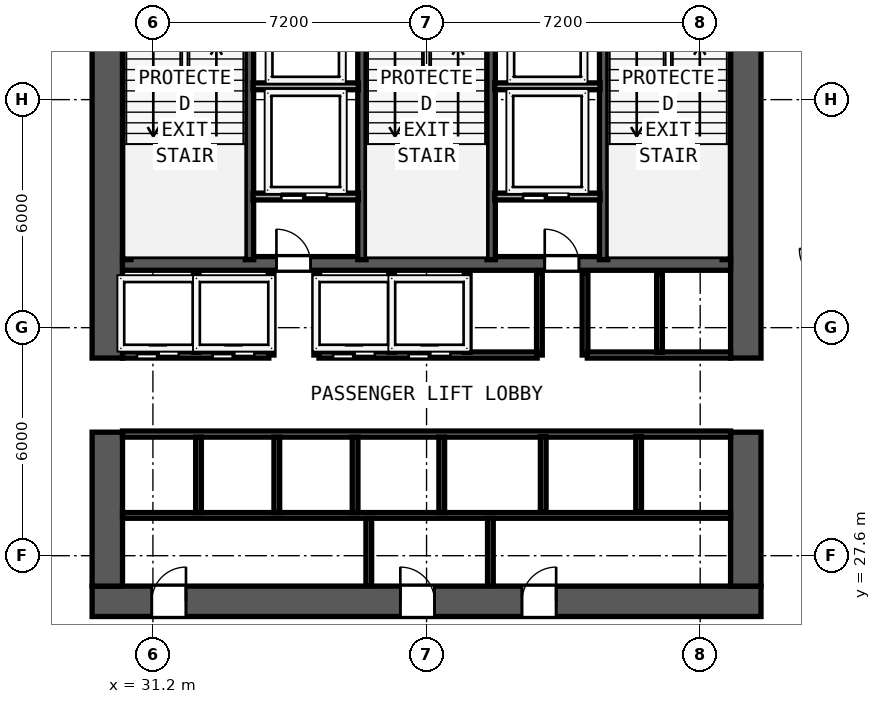
"""IFC4 building model, lengths in metres.
Left out: names, types, materials, properties, quantities, classifications, styles, units other than length and angle.
Written with IfcOpenShell. Run it as: python <this file> out.ifc"""

import sys

from ifc_helpers import new_model, si_unit, direction, frame, frame_2d, origin, place, context, subcontext, project, spatial, rectangle, extrude, element, fill, save


model = new_model("IFC4")
c1 = context("Model", 3, precision=1e-05, world=origin(), true_north=direction((0.0, 1.0)))
c2 = subcontext(c1, "Body", "Model", "MODEL_VIEW")
j1 = project(units=[si_unit("LENGTHUNIT", "METRE"), si_unit("PLANEANGLEUNIT", "RADIAN")], contexts=[c1])
p1 = place(None, origin())
s1 = spatial("IfcSite", under=j1, at=p1, CompositionType="ELEMENT")
p2 = place(p1, origin())
s2 = spatial("IfcBuilding", under=s1, at=p2, CompositionType="ELEMENT")
p3 = place(p2, frame((0.0, 0.0, 70.4)))
s3 = spatial("IfcBuildingStorey", under=s2, at=p3, CompositionType="ELEMENT", Elevation=70.4)
p4 = place(p3, frame((29.6, 26.4, 0.0), z_axis=(0.0, 0.0, 1.0), x_axis=(1.0, 0.0, 0.0)))
e1 = element("IfcWall", 1, at=p4, inside=s3, PredefinedType="SHEAR", context=c2, shape_type="SweptSolid", body=[
    extrude(rectangle(XDim=17.6, YDim=0.8, at=frame_2d((8.8, 0.0))), origin(), (0.0, 0.0, 1.0), 3.6),
])
p5 = place(p4, frame((2.47, 0.0, 0.0), z_axis=(0.0, 0.0, 1.0), x_axis=(-1.0, 0.0, 0.0)))
e2 = element("IfcOpeningElement", 2, at=p5, cuts=e1, PredefinedType="OPENING", context=c2, shape_type="SweptSolid", body=[
    extrude(rectangle(XDim=0.9, YDim=2.1, at=frame_2d((0.45, 1.05))), frame((0.0, 0.41, 0.0), z_axis=(0.0, -1.0, 0.0), x_axis=(1.0, 0.0, 0.0)), (0.0, 0.0, 1.0), 0.82),
])
p6 = place(p4, frame((9.01, 0.0, 0.0), z_axis=(0.0, 0.0, 1.0), x_axis=(-1.0, 0.0, 0.0)))
e3 = element("IfcOpeningElement", 3, at=p6, cuts=e1, PredefinedType="OPENING", context=c2, shape_type="SweptSolid", body=[
    extrude(rectangle(XDim=0.9, YDim=2.1, at=frame_2d((0.45, 1.05))), frame((0.0, 0.41, 0.0), z_axis=(0.0, -1.0, 0.0), x_axis=(1.0, 0.0, 0.0)), (0.0, 0.0, 1.0), 0.82),
])
p7 = place(p4, frame((12.21, 0.0, 0.0), z_axis=(0.0, 0.0, 1.0), x_axis=(-1.0, 0.0, 0.0)))
e4 = element("IfcOpeningElement", 4, at=p7, cuts=e1, PredefinedType="OPENING", context=c2, shape_type="SweptSolid", body=[
    extrude(rectangle(XDim=0.9, YDim=2.1, at=frame_2d((0.45, 1.05))), frame((0.0, 0.41, 0.0), z_axis=(0.0, -1.0, 0.0), x_axis=(1.0, 0.0, 0.0)), (0.0, 0.0, 1.0), 0.82),
])
p8 = place(p3, frame((30.0, 26.8, 0.0), z_axis=(0.0, 0.0, 1.0), x_axis=(0.0, 1.0, 0.0)))
e5 = element("IfcWall", 5, at=p8, inside=s3, PredefinedType="SHEAR", context=c2, shape_type="SweptSolid", body=[
    extrude(rectangle(XDim=4.05, YDim=0.8, at=frame_2d((2.025, 0.0))), origin(), (0.0, 0.0, 1.0), 3.6),
])
p9 = place(p3, frame((30.0, 32.8, 0.0), z_axis=(0.0, 0.0, 1.0), x_axis=(0.0, 1.0, 0.0)))
e6 = element("IfcWall", 6, at=p9, inside=s3, PredefinedType="SHEAR", context=c2, shape_type="SweptSolid", body=[
    extrude(rectangle(XDim=10.0, YDim=0.8, at=frame_2d((5.0, 0.0))), origin(), (0.0, 0.0, 1.0), 3.6),
])
p10 = place(p3, frame((46.8, 26.8, 0.0), z_axis=(0.0, 0.0, 1.0), x_axis=(0.0, 1.0, 0.0)))
e7 = element("IfcWall", 7, at=p10, inside=s3, PredefinedType="SHEAR", context=c2, shape_type="SweptSolid", body=[
    extrude(rectangle(XDim=4.05, YDim=0.8, at=frame_2d((2.025, 0.0))), origin(), (0.0, 0.0, 1.0), 3.6),
])
p11 = place(p3, frame((46.8, 32.8, 0.0), z_axis=(0.0, 0.0, 1.0), x_axis=(0.0, 1.0, 0.0)))
e8 = element("IfcWall", 8, at=p11, inside=s3, PredefinedType="SHEAR", context=c2, shape_type="SweptSolid", body=[
    extrude(rectangle(XDim=10.0, YDim=0.8, at=frame_2d((5.0, 0.0))), origin(), (0.0, 0.0, 1.0), 3.6),
])
p12 = place(p3, frame((30.4, 35.29, 0.0), z_axis=(0.0, 0.0, 1.0), x_axis=(1.0, 0.0, 0.0)))
e9 = element("IfcWall", 9, at=p12, inside=s3, PredefinedType="SHEAR", context=c2, shape_type="SweptSolid", body=[
    extrude(rectangle(XDim=16.0, YDim=0.36, at=frame_2d((8.0, 0.0))), origin(), (0.0, 0.0, 1.0), 3.6),
])
p13 = place(p12, frame((4.95, 0.0, 0.0), z_axis=(0.0, 0.0, 1.0), x_axis=(-1.0, 0.0, 0.0)))
e10 = element("IfcOpeningElement", 10, at=p13, cuts=e9, PredefinedType="OPENING", context=c2, shape_type="SweptSolid", body=[
    extrude(rectangle(XDim=0.9, YDim=2.1, at=frame_2d((0.45, 1.05))), frame((0.0, 0.19, 0.0), z_axis=(0.0, -1.0, 0.0), x_axis=(1.0, 0.0, 0.0)), (0.0, 0.0, 1.0), 0.38),
])
p14 = place(p12, frame((12.01, 0.0, 0.0), z_axis=(0.0, 0.0, 1.0), x_axis=(-1.0, 0.0, 0.0)))
e11 = element("IfcOpeningElement", 11, at=p14, cuts=e9, PredefinedType="OPENING", context=c2, shape_type="SweptSolid", body=[
    extrude(rectangle(XDim=0.9, YDim=2.1, at=frame_2d((0.45, 1.05))), frame((0.0, 0.19, 0.0), z_axis=(0.0, -1.0, 0.0), x_axis=(1.0, 0.0, 0.0)), (0.0, 0.0, 1.0), 0.38),
])
for number, where, z_axis, x_axis in (
    (12, (30.512, 35.39, 0.0), (0.0, 0.0, 1.0), (0.0, 1.0, 0.0)),
    (13, (33.74, 35.39, 0.0), (0.0, 0.0, 1.0), (0.0, 1.0, 0.0)),
    (14, (36.7, 35.39, 0.0), (0.0, 0.0, 1.0), (0.0, 1.0, 0.0)),
    (15, (40.1, 35.39, 0.0), (0.0, 0.0, 1.0), (0.0, 1.0, 0.0)),
    (16, (43.06, 35.39, 0.0), (0.0, 0.0, 1.0), (0.0, 1.0, 0.0)),
    (17, (46.288, 35.39, 0.0), (0.0, 0.0, 1.0), (0.0, 1.0, 0.0)),
):
    element("IfcWall", number, at=place(p3, frame(where, z_axis=z_axis, x_axis=x_axis)), inside=s3, PredefinedType="SHEAR", context=c2, shape_type="SweptSolid", body=[
        extrude(rectangle(XDim=7.41, YDim=0.22, at=frame_2d((3.705, 0.0))), origin(), (0.0, 0.0, 1.0), 3.6),
    ])
for number, where, z_axis, x_axis in (
    (18, (33.835, 39.95, 0.0), (0.0, 0.0, 1.0), (1.0, 0.0, 0.0)),
    (19, (40.195, 39.95, 0.0), (0.0, 0.0, 1.0), (1.0, 0.0, 0.0)),
):
    element("IfcWall", number, at=place(p3, frame(where, z_axis=z_axis, x_axis=x_axis)), inside=s3, PredefinedType="SOLIDWALL", context=c2, shape_type="SweptSolid", body=[
        extrude(rectangle(XDim=2.77, YDim=0.18, at=frame_2d((1.385, 0.0))), origin(), (0.0, 0.0, 1.0), 3.6),
    ])
p15 = place(p3, frame((33.835, 37.05, 0.0), z_axis=(0.0, 0.0, 1.0), x_axis=(1.0, 0.0, 0.0)))
e20 = element("IfcWall", 20, at=p15, inside=s3, PredefinedType="SOLIDWALL", context=c2, shape_type="SweptSolid", body=[
    extrude(rectangle(XDim=2.77, YDim=0.18, at=frame_2d((1.385, 0.0))), origin(), (0.0, 0.0, 1.0), 3.6),
])
p16 = place(p15, frame((1.945, 0.0, 0.0), z_axis=(0.0, 0.0, 1.0), x_axis=(-1.0, 0.0, 0.0)))
e21 = element("IfcOpeningElement", 21, at=p16, cuts=e20, PredefinedType="OPENING", context=c2, shape_type="SweptSolid", body=[
    extrude(rectangle(XDim=1.2, YDim=2.2, at=frame_2d((0.6, 1.1))), frame((0.0, 0.1, 0.0), z_axis=(0.0, -1.0, 0.0), x_axis=(1.0, 0.0, 0.0)), (0.0, 0.0, 1.0), 0.2),
])
for number, where, z_axis, x_axis in (
    (22, (34.31, 32.88, 0.0), (0.0, 0.0, 1.0), (0.0, 1.0, 0.0)),
    (23, (35.51, 32.88, 0.0), (0.0, 0.0, 1.0), (0.0, 1.0, 0.0)),
):
    element("IfcWall", number, at=place(p3, frame(where, z_axis=z_axis, x_axis=x_axis)), inside=s3, PredefinedType="SOLIDWALL", context=c2, shape_type="SweptSolid", body=[
        extrude(rectangle(XDim=2.17, YDim=0.15, at=frame_2d((1.085, 0.0))), origin(), (0.0, 0.0, 1.0), 3.6),
    ])
p17 = place(p3, frame((40.195, 37.05, 0.0), z_axis=(0.0, 0.0, 1.0), x_axis=(1.0, 0.0, 0.0)))
e24 = element("IfcWall", 24, at=p17, inside=s3, PredefinedType="SOLIDWALL", context=c2, shape_type="SweptSolid", body=[
    extrude(rectangle(XDim=2.77, YDim=0.18, at=frame_2d((1.385, 0.0))), origin(), (0.0, 0.0, 1.0), 3.6),
])
p18 = place(p17, frame((1.945, 0.0, 0.0), z_axis=(0.0, 0.0, 1.0), x_axis=(-1.0, 0.0, 0.0)))
e25 = element("IfcOpeningElement", 25, at=p18, cuts=e24, PredefinedType="OPENING", context=c2, shape_type="SweptSolid", body=[
    extrude(rectangle(XDim=1.2, YDim=2.2, at=frame_2d((0.6, 1.1))), frame((0.0, 0.1, 0.0), z_axis=(0.0, -1.0, 0.0), x_axis=(1.0, 0.0, 0.0)), (0.0, 0.0, 1.0), 0.2),
])
for number, where, z_axis, x_axis in (
    (26, (41.37, 32.88, 0.0), (0.0, 0.0, 1.0), (0.0, 1.0, 0.0)),
    (27, (42.57, 32.88, 0.0), (0.0, 0.0, 1.0), (0.0, 1.0, 0.0)),
):
    element("IfcWall", number, at=place(p3, frame(where, z_axis=z_axis, x_axis=x_axis)), inside=s3, PredefinedType="SOLIDWALL", context=c2, shape_type="SweptSolid", body=[
        extrude(rectangle(XDim=2.17, YDim=0.15, at=frame_2d((1.085, 0.0))), origin(), (0.0, 0.0, 1.0), 3.6),
    ])
p19 = place(p3, frame((30.4, 32.88, 0.0), z_axis=(0.0, 0.0, 1.0), x_axis=(1.0, 0.0, 0.0)))
e28 = element("IfcWall", 28, at=p19, inside=s3, PredefinedType="SOLIDWALL", context=c2, shape_type="SweptSolid", body=[
    extrude(rectangle(XDim=3.85, YDim=0.16, at=frame_2d((1.925, 0.0))), origin(), (0.0, 0.0, 1.0), 3.6),
])
p20 = place(p19, frame((1.48, 0.0, 0.0), z_axis=(0.0, 0.0, 1.0), x_axis=(-1.0, 0.0, 0.0)))
e29 = element("IfcOpeningElement", 29, at=p20, cuts=e28, PredefinedType="OPENING", context=c2, shape_type="SweptSolid", body=[
    extrude(rectangle(XDim=1.1, YDim=2.2, at=frame_2d((0.55, 1.1))), frame((0.0, 0.09, 0.0), z_axis=(0.0, -1.0, 0.0), x_axis=(1.0, 0.0, 0.0)), (0.0, 0.0, 1.0), 0.18),
])
p21 = place(p19, frame((3.47, 0.0, 0.0), z_axis=(0.0, 0.0, 1.0), x_axis=(-1.0, 0.0, 0.0)))
e30 = element("IfcOpeningElement", 30, at=p21, cuts=e28, PredefinedType="OPENING", context=c2, shape_type="SweptSolid", body=[
    extrude(rectangle(XDim=1.1, YDim=2.2, at=frame_2d((0.55, 1.1))), frame((0.0, 0.09, 0.0), z_axis=(0.0, -1.0, 0.0), x_axis=(1.0, 0.0, 0.0)), (0.0, 0.0, 1.0), 0.18),
])
p22 = place(p3, frame((35.57, 32.88, 0.0), z_axis=(0.0, 0.0, 1.0), x_axis=(1.0, 0.0, 0.0)))
e31 = element("IfcWall", 31, at=p22, inside=s3, PredefinedType="SOLIDWALL", context=c2, shape_type="SweptSolid", body=[
    extrude(rectangle(XDim=5.74, YDim=0.16, at=frame_2d((2.87, 0.0))), origin(), (0.0, 0.0, 1.0), 3.6),
])
p23 = place(p22, frame((1.47, 0.0, 0.0), z_axis=(0.0, 0.0, 1.0), x_axis=(-1.0, 0.0, 0.0)))
e32 = element("IfcOpeningElement", 32, at=p23, cuts=e31, PredefinedType="OPENING", context=c2, shape_type="SweptSolid", body=[
    extrude(rectangle(XDim=1.1, YDim=2.2, at=frame_2d((0.55, 1.1))), frame((0.0, 0.09, 0.0), z_axis=(0.0, -1.0, 0.0), x_axis=(1.0, 0.0, 0.0)), (0.0, 0.0, 1.0), 0.18),
])
p24 = place(p22, frame((3.46, 0.0, 0.0), z_axis=(0.0, 0.0, 1.0), x_axis=(-1.0, 0.0, 0.0)))
e33 = element("IfcOpeningElement", 33, at=p24, cuts=e31, PredefinedType="OPENING", context=c2, shape_type="SweptSolid", body=[
    extrude(rectangle(XDim=1.1, YDim=2.2, at=frame_2d((0.55, 1.1))), frame((0.0, 0.09, 0.0), z_axis=(0.0, -1.0, 0.0), x_axis=(1.0, 0.0, 0.0)), (0.0, 0.0, 1.0), 0.18),
])
p25 = place(p3, frame((42.63, 32.88, 0.0), z_axis=(0.0, 0.0, 1.0), x_axis=(1.0, 0.0, 0.0)))
e34 = element("IfcWall", 34, at=p25, inside=s3, PredefinedType="SOLIDWALL", context=c2, shape_type="SweptSolid", body=[
    extrude(rectangle(XDim=3.77, YDim=0.16, at=frame_2d((1.885, 0.0))), origin(), (0.0, 0.0, 1.0), 3.6),
])
for number, where, z_axis, x_axis in (
    (35, (32.34, 32.95, 0.0), (0.0, 0.0, 1.0), (0.0, 1.0, 0.0)),
    (36, (37.48, 32.95, 0.0), (0.0, 0.0, 1.0), (0.0, 1.0, 0.0)),
    (37, (39.47, 32.95, 0.0), (0.0, 0.0, 1.0), (0.0, 1.0, 0.0)),
    (38, (44.53, 32.95, 0.0), (0.0, 0.0, 1.0), (0.0, 1.0, 0.0)),
):
    element("IfcWall", number, at=place(p3, frame(where, z_axis=z_axis, x_axis=x_axis)), inside=s3, PredefinedType="SOLIDWALL", context=c2, shape_type="SweptSolid", body=[
        extrude(rectangle(XDim=2.05, YDim=0.15, at=frame_2d((1.025, 0.0))), origin(), (0.0, 0.0, 1.0), 3.6),
    ])
p26 = place(p3, frame((30.4, 30.8, 0.0), z_axis=(0.0, 0.0, 1.0), x_axis=(1.0, 0.0, 0.0)))
e39 = element("IfcWall", 39, at=p26, inside=s3, PredefinedType="SOLIDWALL", context=c2, shape_type="SweptSolid", body=[
    extrude(rectangle(XDim=16.0, YDim=0.16, at=frame_2d((8.0, 0.0))), origin(), (0.0, 0.0, 1.0), 3.6),
])
p27 = place(p3, frame((30.4, 28.66, 0.0), z_axis=(0.0, 0.0, 1.0), x_axis=(1.0, 0.0, 0.0)))
e40 = element("IfcWall", 40, at=p27, inside=s3, PredefinedType="PARTITIONING", context=c2, shape_type="SweptSolid", body=[
    extrude(rectangle(XDim=16.0, YDim=0.15, at=frame_2d((8.0, 0.0))), origin(), (0.0, 0.0, 1.0), 3.6),
])
for number, where, z_axis, x_axis in (
    (41, (32.4, 28.735, 0.0), (0.0, 0.0, 1.0), (0.0, 1.0, 0.0)),
    (42, (34.46, 28.735, 0.0), (0.0, 0.0, 1.0), (0.0, 1.0, 0.0)),
    (43, (36.52, 28.735, 0.0), (0.0, 0.0, 1.0), (0.0, 1.0, 0.0)),
    (44, (38.8, 28.735, 0.0), (0.0, 0.0, 1.0), (0.0, 1.0, 0.0)),
):
    element("IfcWall", number, at=place(p3, frame(where, z_axis=z_axis, x_axis=x_axis)), inside=s3, PredefinedType="SOLIDWALL", context=c2, shape_type="SweptSolid", body=[
        extrude(rectangle(XDim=1.985, YDim=0.15, at=frame_2d((0.992, 0.0))), origin(), (0.0, 0.0, 1.0), 3.6),
    ])
for number, where, z_axis, x_axis in (
    (45, (36.88, 26.81, 0.0), (0.0, 0.0, 1.0), (0.0, 1.0, 0.0)),
    (46, (40.08, 26.81, 0.0), (0.0, 0.0, 1.0), (0.0, 1.0, 0.0)),
):
    element("IfcWall", number, at=place(p3, frame(where, z_axis=z_axis, x_axis=x_axis)), inside=s3, PredefinedType="PARTITIONING", context=c2, shape_type="SweptSolid", body=[
        extrude(rectangle(XDim=1.77, YDim=0.15, at=frame_2d((0.885, 0.0))), origin(), (0.0, 0.0, 1.0), 3.6),
    ])
for number, where, z_axis, x_axis in (
    (47, (41.47, 28.75, 0.0), (0.0, 0.0, 1.0), (0.0, 1.0, 0.0)),
    (48, (43.98, 28.75, 0.0), (0.0, 0.0, 1.0), (0.0, 1.0, 0.0)),
):
    element("IfcWall", number, at=place(p3, frame(where, z_axis=z_axis, x_axis=x_axis)), inside=s3, PredefinedType="SOLIDWALL", context=c2, shape_type="SweptSolid", body=[
        extrude(rectangle(XDim=1.985, YDim=0.15, at=frame_2d((0.993, 0.0))), origin(), (0.0, 0.0, 1.0), 3.6),
    ])
p28 = place(p16, origin())
e49 = element("IfcDoor", 49, at=p28, inside=s3, OperationType="SLIDING_TO_RIGHT", PredefinedType="DOOR", context=c2, shape_type="SweptSolid", body=[
    extrude(rectangle(XDim=1.2, YDim=2.2, at=frame_2d((0.6, 1.1))), frame((0.0, 0.025, 0.0), z_axis=(0.0, -1.0, 0.0), x_axis=(1.0, 0.0, 0.0)), (0.0, 0.0, 1.0), 0.05),
])
fill(e21, e49)
p29 = place(p13, origin())
e50 = element("IfcDoor", 50, at=p29, inside=s3, OperationType="SINGLE_SWING_RIGHT", PredefinedType="DOOR", context=c2, shape_type="SweptSolid", body=[
    extrude(rectangle(XDim=0.9, YDim=2.1, at=frame_2d((0.45, 1.05))), frame((0.0, 0.025, 0.0), z_axis=(0.0, -1.0, 0.0), x_axis=(1.0, 0.0, 0.0)), (0.0, 0.0, 1.0), 0.05),
])
fill(e10, e50)
p30 = place(p18, origin())
e51 = element("IfcDoor", 51, at=p30, inside=s3, OperationType="SLIDING_TO_RIGHT", PredefinedType="DOOR", context=c2, shape_type="SweptSolid", body=[
    extrude(rectangle(XDim=1.2, YDim=2.2, at=frame_2d((0.6, 1.1))), frame((0.0, 0.025, 0.0), z_axis=(0.0, -1.0, 0.0), x_axis=(1.0, 0.0, 0.0)), (0.0, 0.0, 1.0), 0.05),
])
fill(e25, e51)
p31 = place(p14, origin())
e52 = element("IfcDoor", 52, at=p31, inside=s3, OperationType="SINGLE_SWING_RIGHT", PredefinedType="DOOR", context=c2, shape_type="SweptSolid", body=[
    extrude(rectangle(XDim=0.9, YDim=2.1, at=frame_2d((0.45, 1.05))), frame((0.0, 0.025, 0.0), z_axis=(0.0, -1.0, 0.0), x_axis=(1.0, 0.0, 0.0)), (0.0, 0.0, 1.0), 0.05),
])
fill(e11, e52)
p32 = place(p20, origin())
e53 = element("IfcDoor", 53, at=p32, inside=s3, OperationType="SLIDING_TO_LEFT", PredefinedType="DOOR", context=c2, shape_type="SweptSolid", body=[
    extrude(rectangle(XDim=1.1, YDim=2.2, at=frame_2d((0.55, 1.1))), frame((0.0, 0.025, 0.0), z_axis=(0.0, -1.0, 0.0), x_axis=(1.0, 0.0, 0.0)), (0.0, 0.0, 1.0), 0.05),
])
fill(e29, e53)
p33 = place(p21, origin())
e54 = element("IfcDoor", 54, at=p33, inside=s3, OperationType="SLIDING_TO_LEFT", PredefinedType="DOOR", context=c2, shape_type="SweptSolid", body=[
    extrude(rectangle(XDim=1.1, YDim=2.2, at=frame_2d((0.55, 1.1))), frame((0.0, 0.025, 0.0), z_axis=(0.0, -1.0, 0.0), x_axis=(1.0, 0.0, 0.0)), (0.0, 0.0, 1.0), 0.05),
])
fill(e30, e54)
p34 = place(p23, origin())
e55 = element("IfcDoor", 55, at=p34, inside=s3, OperationType="SLIDING_TO_LEFT", PredefinedType="DOOR", context=c2, shape_type="SweptSolid", body=[
    extrude(rectangle(XDim=1.1, YDim=2.2, at=frame_2d((0.55, 1.1))), frame((0.0, 0.025, 0.0), z_axis=(0.0, -1.0, 0.0), x_axis=(1.0, 0.0, 0.0)), (0.0, 0.0, 1.0), 0.05),
])
fill(e32, e55)
p35 = place(p24, origin())
e56 = element("IfcDoor", 56, at=p35, inside=s3, OperationType="SLIDING_TO_LEFT", PredefinedType="DOOR", context=c2, shape_type="SweptSolid", body=[
    extrude(rectangle(XDim=1.1, YDim=2.2, at=frame_2d((0.55, 1.1))), frame((0.0, 0.025, 0.0), z_axis=(0.0, -1.0, 0.0), x_axis=(1.0, 0.0, 0.0)), (0.0, 0.0, 1.0), 0.05),
])
fill(e33, e56)
p36 = place(p5, origin())
e57 = element("IfcDoor", 57, at=p36, inside=s3, OperationType="SINGLE_SWING_LEFT", PredefinedType="DOOR", context=c2, shape_type="SweptSolid", body=[
    extrude(rectangle(XDim=0.9, YDim=2.1, at=frame_2d((0.45, 1.05))), frame((0.0, -0.195, 0.0), z_axis=(0.0, -1.0, 0.0), x_axis=(1.0, 0.0, 0.0)), (0.0, 0.0, 1.0), 0.05),
])
fill(e2, e57)
p37 = place(p6, origin())
e58 = element("IfcDoor", 58, at=p37, inside=s3, OperationType="SINGLE_SWING_RIGHT", PredefinedType="DOOR", context=c2, shape_type="SweptSolid", body=[
    extrude(rectangle(XDim=0.9, YDim=2.1, at=frame_2d((0.45, 1.05))), frame((0.0, -0.195, 0.0), z_axis=(0.0, -1.0, 0.0), x_axis=(1.0, 0.0, 0.0)), (0.0, 0.0, 1.0), 0.05),
])
fill(e3, e58)
p38 = place(p7, origin())
e59 = element("IfcDoor", 59, at=p38, inside=s3, OperationType="SINGLE_SWING_LEFT", PredefinedType="DOOR", context=c2, shape_type="SweptSolid", body=[
    extrude(rectangle(XDim=0.9, YDim=2.1, at=frame_2d((0.45, 1.05))), frame((0.0, -0.195, 0.0), z_axis=(0.0, -1.0, 0.0), x_axis=(1.0, 0.0, 0.0)), (0.0, 0.0, 1.0), 0.05),
])
fill(e4, e59)
save(model, sys.argv[1])
